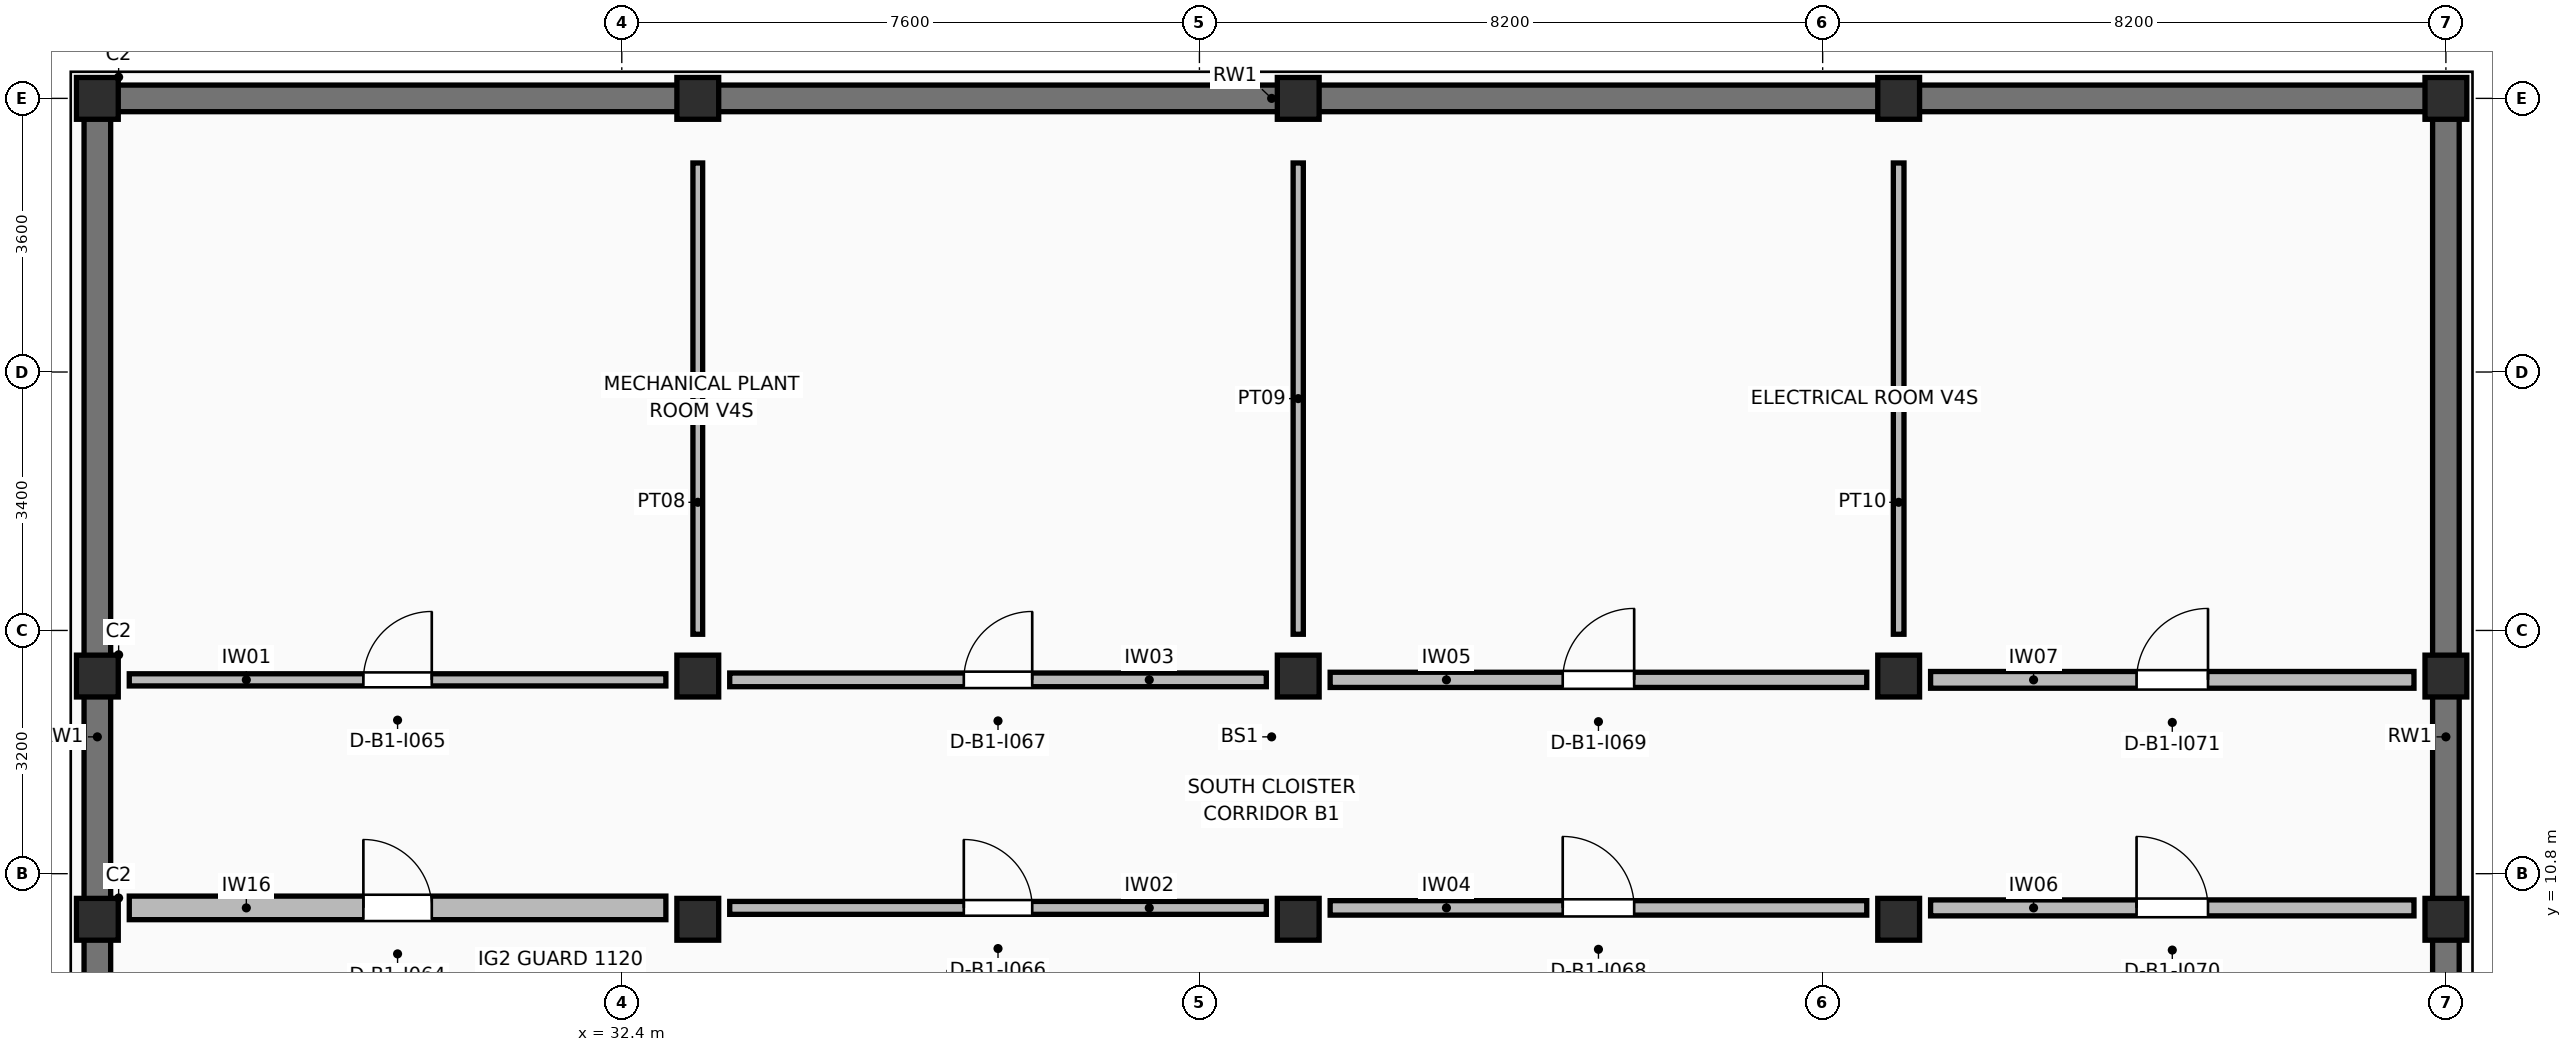
"""IFC4 building model, lengths in metres.
Left out: names, types, materials, properties, quantities, classifications, styles, units other than length and angle.
Written with IfcOpenShell. Run it as: python <this file> out.ifc"""

import sys

from ifc_helpers import new_model, si_unit, direction, frame, frame_2d, origin, origin_2d, place, context, subcontext, project, spatial, rectangle, extrude, element, fill, save


model = new_model("IFC4")
c1 = context("Model", 3, precision=1e-05, world=origin(), true_north=direction((0.0, 1.0)))
c2 = subcontext(c1, "Body", "Model", "MODEL_VIEW")
j1 = project(units=[si_unit("LENGTHUNIT", "METRE"), si_unit("PLANEANGLEUNIT", "RADIAN")], contexts=[c1])
p1 = place(None, origin())
s1 = spatial("IfcSite", under=j1, at=p1, CompositionType="ELEMENT")
p2 = place(p1, origin())
s2 = spatial("IfcBuilding", under=s1, at=p2, CompositionType="ELEMENT")
p3 = place(p2, frame((0.0, 0.0, -4.08)))
s3 = spatial("IfcBuildingStorey", under=s2, at=p3, CompositionType="ELEMENT", Elevation=-4.08)
for number, where, z_axis, x_axis in (
    (1, (25.5, 10.2, 0.0), (0.0, 0.0, 1.0), (1.0, 0.0, 0.0)),
    (2, (25.5, 13.4, 0.0), (0.0, 0.0, 1.0), (1.0, 0.0, 0.0)),
    (3, (25.5, 21.0, 0.0), (0.0, 0.0, 1.0), (1.0, 0.0, 0.0)),
    (4, (33.4, 10.2, 0.0), (0.0, 0.0, 1.0), (1.0, 0.0, 0.0)),
    (5, (33.4, 13.4, 0.0), (0.0, 0.0, 1.0), (1.0, 0.0, 0.0)),
    (6, (33.4, 21.0, 0.0), (0.0, 0.0, 1.0), (1.0, 0.0, 0.0)),
    (7, (41.3, 10.2, 0.0), (0.0, 0.0, 1.0), (1.0, 0.0, 0.0)),
    (8, (41.3, 13.4, 0.0), (0.0, 0.0, 1.0), (1.0, 0.0, 0.0)),
    (9, (41.3, 21.0, 0.0), (0.0, 0.0, 1.0), (1.0, 0.0, 0.0)),
    (10, (49.2, 10.2, 0.0), (0.0, 0.0, 1.0), (1.0, 0.0, 0.0)),
    (11, (49.2, 13.4, 0.0), (0.0, 0.0, 1.0), (1.0, 0.0, 0.0)),
    (12, (49.2, 21.0, 0.0), (0.0, 0.0, 1.0), (1.0, 0.0, 0.0)),
    (13, (56.4, 10.2, 0.0), (0.0, 0.0, 1.0), (1.0, 0.0, 0.0)),
    (14, (56.4, 13.4, 0.0), (0.0, 0.0, 1.0), (1.0, 0.0, 0.0)),
    (15, (56.4, 21.0, 0.0), (0.0, 0.0, 1.0), (1.0, 0.0, 0.0)),
):
    element("IfcColumn", number, at=place(p3, frame(where, z_axis=z_axis, x_axis=x_axis)), inside=s3, PredefinedType="COLUMN", context=c2, shape_type="SweptSolid", body=[
        extrude(rectangle(XDim=0.55, YDim=0.55, at=origin_2d()), origin(), (0.0, 0.0, 1.0), 4.08),
    ])
p4 = place(p3, frame((25.325, 21.0, 0.0), z_axis=(0.0, 0.0, 1.0), x_axis=(1.0, 0.0, 0.0)))
e16 = element("IfcWall", 16, at=p4, inside=s3, PredefinedType="USERDEFINED", context=c2, shape_type="SweptSolid", body=[
    extrude(rectangle(XDim=31.25, YDim=0.35, at=frame_2d((15.625, 0.0))), origin(), (0.0, 0.0, 1.0), 3.065),
])
for number, where, z_axis, x_axis in (
    (17, (25.5, 4.375, 0.0), (0.0, 0.0, 1.0), (0.0, 1.0, 0.0)),
    (18, (56.4, 4.375, 0.0), (0.0, 0.0, 1.0), (0.0, 1.0, 0.0)),
):
    element("IfcWall", number, at=place(p3, frame(where, z_axis=z_axis, x_axis=x_axis)), inside=s3, PredefinedType="USERDEFINED", context=c2, shape_type="SweptSolid", body=[
        extrude(rectangle(XDim=16.45, YDim=0.35, at=frame_2d((8.225, 0.0))), origin(), (0.0, 0.0, 1.0), 3.065),
    ])
p5 = place(p3, frame((25.92, 10.35, 0.0), z_axis=(0.0, 0.0, 1.0), x_axis=(1.0, 0.0, 0.0)))
e19 = element("IfcWall", 19, at=p5, inside=s3, PredefinedType="STANDARD", context=c2, shape_type="SweptSolid", body=[
    extrude(rectangle(XDim=7.06, YDim=0.31, at=frame_2d((3.53, 0.0))), origin(), (0.0, 0.0, 1.0), 2.72),
])
p6 = place(p5, frame((3.08, 0.0, 0.0)))
e20 = element("IfcOpeningElement", 20, at=p6, cuts=e19, PredefinedType="OPENING", context=c2, shape_type="SweptSolid", body=[
    extrude(rectangle(XDim=0.9, YDim=2.06, at=frame_2d((0.45, 1.03))), frame((0.0, 0.165, 0.0), z_axis=(0.0, -1.0, 0.0), x_axis=(1.0, 0.0, 0.0)), (0.0, 0.0, 1.0), 0.33),
])
p7 = place(p3, frame((25.92, 13.35, 0.0), z_axis=(0.0, 0.0, 1.0), x_axis=(1.0, 0.0, 0.0)))
e21 = element("IfcWall", 21, at=p7, inside=s3, PredefinedType="STANDARD", context=c2, shape_type="SweptSolid", body=[
    extrude(rectangle(XDim=7.06, YDim=0.16, at=frame_2d((3.53, 0.0))), origin(), (0.0, 0.0, 1.0), 2.72),
])
p8 = place(p7, frame((3.08, 0.0, 0.0)))
e22 = element("IfcOpeningElement", 22, at=p8, cuts=e21, PredefinedType="OPENING", context=c2, shape_type="SweptSolid", body=[
    extrude(rectangle(XDim=0.9, YDim=2.12, at=frame_2d((0.45, 1.06))), frame((0.0, 0.09, 0.0), z_axis=(0.0, -1.0, 0.0), x_axis=(1.0, 0.0, 0.0)), (0.0, 0.0, 1.0), 0.18),
])
p9 = place(p3, frame((33.82, 10.35, 0.0), z_axis=(0.0, 0.0, 1.0), x_axis=(1.0, 0.0, 0.0)))
e23 = element("IfcWall", 23, at=p9, inside=s3, PredefinedType="STANDARD", context=c2, shape_type="SweptSolid", body=[
    extrude(rectangle(XDim=7.06, YDim=0.17, at=frame_2d((3.53, 0.0))), origin(), (0.0, 0.0, 1.0), 2.72),
])
p10 = place(p9, frame((3.08, 0.0, 0.0)))
e24 = element("IfcOpeningElement", 24, at=p10, cuts=e23, PredefinedType="OPENING", context=c2, shape_type="SweptSolid", body=[
    extrude(rectangle(XDim=0.9, YDim=2.18, at=frame_2d((0.45, 1.09))), frame((0.0, 0.095, 0.0), z_axis=(0.0, -1.0, 0.0), x_axis=(1.0, 0.0, 0.0)), (0.0, 0.0, 1.0), 0.19),
])
p11 = place(p3, frame((33.82, 13.35, 0.0), z_axis=(0.0, 0.0, 1.0), x_axis=(1.0, 0.0, 0.0)))
e25 = element("IfcWall", 25, at=p11, inside=s3, PredefinedType="STANDARD", context=c2, shape_type="SweptSolid", body=[
    extrude(rectangle(XDim=7.06, YDim=0.18, at=frame_2d((3.53, 0.0))), origin(), (0.0, 0.0, 1.0), 2.72),
])
p12 = place(p11, frame((3.08, 0.0, 0.0)))
e26 = element("IfcOpeningElement", 26, at=p12, cuts=e25, PredefinedType="OPENING", context=c2, shape_type="SweptSolid", body=[
    extrude(rectangle(XDim=0.9, YDim=2.24, at=frame_2d((0.45, 1.12))), frame((0.0, 0.1, 0.0), z_axis=(0.0, -1.0, 0.0), x_axis=(1.0, 0.0, 0.0)), (0.0, 0.0, 1.0), 0.2),
])
p13 = place(p3, frame((41.72, 10.35, 0.0), z_axis=(0.0, 0.0, 1.0), x_axis=(1.0, 0.0, 0.0)))
e27 = element("IfcWall", 27, at=p13, inside=s3, PredefinedType="STANDARD", context=c2, shape_type="SweptSolid", body=[
    extrude(rectangle(XDim=7.06, YDim=0.19, at=frame_2d((3.53, 0.0))), origin(), (0.0, 0.0, 1.0), 2.72),
])
p14 = place(p13, frame((3.06, 0.0, 0.0)))
e28 = element("IfcOpeningElement", 28, at=p14, cuts=e27, PredefinedType="OPENING", context=c2, shape_type="SweptSolid", body=[
    extrude(rectangle(XDim=0.94, YDim=2.06, at=frame_2d((0.47, 1.03))), frame((0.0, 0.105, 0.0), z_axis=(0.0, -1.0, 0.0), x_axis=(1.0, 0.0, 0.0)), (0.0, 0.0, 1.0), 0.21),
])
p15 = place(p3, frame((41.72, 13.35, 0.0), z_axis=(0.0, 0.0, 1.0), x_axis=(1.0, 0.0, 0.0)))
e29 = element("IfcWall", 29, at=p15, inside=s3, PredefinedType="STANDARD", context=c2, shape_type="SweptSolid", body=[
    extrude(rectangle(XDim=7.06, YDim=0.2, at=frame_2d((3.53, 0.0))), origin(), (0.0, 0.0, 1.0), 2.72),
])
p16 = place(p15, frame((3.06, 0.0, 0.0)))
e30 = element("IfcOpeningElement", 30, at=p16, cuts=e29, PredefinedType="OPENING", context=c2, shape_type="SweptSolid", body=[
    extrude(rectangle(XDim=0.94, YDim=2.12, at=frame_2d((0.47, 1.06))), frame((0.0, 0.11, 0.0), z_axis=(0.0, -1.0, 0.0), x_axis=(1.0, 0.0, 0.0)), (0.0, 0.0, 1.0), 0.22),
])
p17 = place(p3, frame((49.62, 10.35, 0.0), z_axis=(0.0, 0.0, 1.0), x_axis=(1.0, 0.0, 0.0)))
e31 = element("IfcWall", 31, at=p17, inside=s3, PredefinedType="STANDARD", context=c2, shape_type="SweptSolid", body=[
    extrude(rectangle(XDim=6.36, YDim=0.21, at=frame_2d((3.18, 0.0))), origin(), (0.0, 0.0, 1.0), 2.72),
])
p18 = place(p17, frame((2.71, 0.0, 0.0)))
e32 = element("IfcOpeningElement", 32, at=p18, cuts=e31, PredefinedType="OPENING", context=c2, shape_type="SweptSolid", body=[
    extrude(rectangle(XDim=0.94, YDim=2.18, at=frame_2d((0.47, 1.09))), frame((0.0, 0.115, 0.0), z_axis=(0.0, -1.0, 0.0), x_axis=(1.0, 0.0, 0.0)), (0.0, 0.0, 1.0), 0.23),
])
p19 = place(p3, frame((49.62, 13.35, 0.0), z_axis=(0.0, 0.0, 1.0), x_axis=(1.0, 0.0, 0.0)))
e33 = element("IfcWall", 33, at=p19, inside=s3, PredefinedType="STANDARD", context=c2, shape_type="SweptSolid", body=[
    extrude(rectangle(XDim=6.36, YDim=0.22, at=frame_2d((3.18, 0.0))), origin(), (0.0, 0.0, 1.0), 2.72),
])
p20 = place(p19, frame((2.71, 0.0, 0.0)))
e34 = element("IfcOpeningElement", 34, at=p20, cuts=e33, PredefinedType="OPENING", context=c2, shape_type="SweptSolid", body=[
    extrude(rectangle(XDim=0.94, YDim=2.24, at=frame_2d((0.47, 1.12))), frame((0.0, 0.12, 0.0), z_axis=(0.0, -1.0, 0.0), x_axis=(1.0, 0.0, 0.0)), (0.0, 0.0, 1.0), 0.24),
])
p21 = place(p3, frame((33.4, 13.95, 0.0), z_axis=(0.0, 0.0, 1.0), x_axis=(0.0, 1.0, 0.0)))
e35 = element("IfcWall", 35, at=p21, inside=s3, PredefinedType="PARTITIONING", context=c2, shape_type="SweptSolid", body=[
    extrude(rectangle(XDim=6.2, YDim=0.128, at=frame_2d((3.1, 0.0))), origin(), (0.0, 0.0, 1.0), 2.72),
])
p22 = place(p3, frame((41.3, 13.95, 0.0), z_axis=(0.0, 0.0, 1.0), x_axis=(0.0, 1.0, 0.0)))
e36 = element("IfcWall", 36, at=p22, inside=s3, PredefinedType="PARTITIONING", context=c2, shape_type="SweptSolid", body=[
    extrude(rectangle(XDim=6.2, YDim=0.134, at=frame_2d((3.1, 0.0))), origin(), (0.0, 0.0, 1.0), 2.72),
])
p23 = place(p3, frame((49.2, 13.95, 0.0), z_axis=(0.0, 0.0, 1.0), x_axis=(0.0, 1.0, 0.0)))
e37 = element("IfcWall", 37, at=p23, inside=s3, PredefinedType="PARTITIONING", context=c2, shape_type="SweptSolid", body=[
    extrude(rectangle(XDim=6.2, YDim=0.14, at=frame_2d((3.1, 0.0))), origin(), (0.0, 0.0, 1.0), 2.72),
])
p24 = place(p6, origin())
e38 = element("IfcDoor", 38, at=p24, inside=s3, OperationType="SINGLE_SWING_LEFT", PredefinedType="DOOR", context=c2, shape_type="SweptSolid", body=[
    extrude(rectangle(XDim=0.9, YDim=2.06, at=frame_2d((0.45, 1.03))), frame((0.0, 0.025, 0.0), z_axis=(0.0, -1.0, 0.0), x_axis=(1.0, 0.0, 0.0)), (0.0, 0.0, 1.0), 0.05),
])
fill(e20, e38)
p25 = place(p8, frame((0.9, 0.0, 0.0), z_axis=(0.0, 0.0, 1.0), x_axis=(-1.0, 0.0, 0.0)))
e39 = element("IfcDoor", 39, at=p25, inside=s3, OperationType="SINGLE_SWING_RIGHT", PredefinedType="DOOR", context=c2, shape_type="SweptSolid", body=[
    extrude(rectangle(XDim=0.9, YDim=2.12, at=frame_2d((0.45, 1.06))), frame((0.0, 0.025, 0.0), z_axis=(0.0, -1.0, 0.0), x_axis=(1.0, 0.0, 0.0)), (0.0, 0.0, 1.0), 0.05),
])
fill(e22, e39)
p26 = place(p10, origin())
e40 = element("IfcDoor", 40, at=p26, inside=s3, OperationType="SINGLE_SWING_LEFT", PredefinedType="DOOR", context=c2, shape_type="SweptSolid", body=[
    extrude(rectangle(XDim=0.9, YDim=2.18, at=frame_2d((0.45, 1.09))), frame((0.0, 0.025, 0.0), z_axis=(0.0, -1.0, 0.0), x_axis=(1.0, 0.0, 0.0)), (0.0, 0.0, 1.0), 0.05),
])
fill(e24, e40)
p27 = place(p12, frame((0.9, 0.0, 0.0), z_axis=(0.0, 0.0, 1.0), x_axis=(-1.0, 0.0, 0.0)))
e41 = element("IfcDoor", 41, at=p27, inside=s3, OperationType="SINGLE_SWING_RIGHT", PredefinedType="DOOR", context=c2, shape_type="SweptSolid", body=[
    extrude(rectangle(XDim=0.9, YDim=2.24, at=frame_2d((0.45, 1.12))), frame((0.0, 0.025, 0.0), z_axis=(0.0, -1.0, 0.0), x_axis=(1.0, 0.0, 0.0)), (0.0, 0.0, 1.0), 0.05),
])
fill(e26, e41)
p28 = place(p14, origin())
e42 = element("IfcDoor", 42, at=p28, inside=s3, OperationType="SINGLE_SWING_LEFT", PredefinedType="DOOR", context=c2, shape_type="SweptSolid", body=[
    extrude(rectangle(XDim=0.94, YDim=2.06, at=frame_2d((0.47, 1.03))), frame((0.0, 0.025, 0.0), z_axis=(0.0, -1.0, 0.0), x_axis=(1.0, 0.0, 0.0)), (0.0, 0.0, 1.0), 0.05),
])
fill(e28, e42)
p29 = place(p16, frame((0.94, 0.0, 0.0), z_axis=(0.0, 0.0, 1.0), x_axis=(-1.0, 0.0, 0.0)))
e43 = element("IfcDoor", 43, at=p29, inside=s3, OperationType="SINGLE_SWING_RIGHT", PredefinedType="DOOR", context=c2, shape_type="SweptSolid", body=[
    extrude(rectangle(XDim=0.94, YDim=2.12, at=frame_2d((0.47, 1.06))), frame((0.0, 0.025, 0.0), z_axis=(0.0, -1.0, 0.0), x_axis=(1.0, 0.0, 0.0)), (0.0, 0.0, 1.0), 0.05),
])
fill(e30, e43)
p30 = place(p18, origin())
e44 = element("IfcDoor", 44, at=p30, inside=s3, OperationType="SINGLE_SWING_LEFT", PredefinedType="DOOR", context=c2, shape_type="SweptSolid", body=[
    extrude(rectangle(XDim=0.94, YDim=2.18, at=frame_2d((0.47, 1.09))), frame((0.0, 0.025, 0.0), z_axis=(0.0, -1.0, 0.0), x_axis=(1.0, 0.0, 0.0)), (0.0, 0.0, 1.0), 0.05),
])
fill(e32, e44)
p31 = place(p20, frame((0.94, 0.0, 0.0), z_axis=(0.0, 0.0, 1.0), x_axis=(-1.0, 0.0, 0.0)))
e45 = element("IfcDoor", 45, at=p31, inside=s3, OperationType="SINGLE_SWING_RIGHT", PredefinedType="DOOR", context=c2, shape_type="SweptSolid", body=[
    extrude(rectangle(XDim=0.94, YDim=2.24, at=frame_2d((0.47, 1.12))), frame((0.0, 0.025, 0.0), z_axis=(0.0, -1.0, 0.0), x_axis=(1.0, 0.0, 0.0)), (0.0, 0.0, 1.0), 0.05),
])
fill(e34, e45)
save(model, sys.argv[1])
